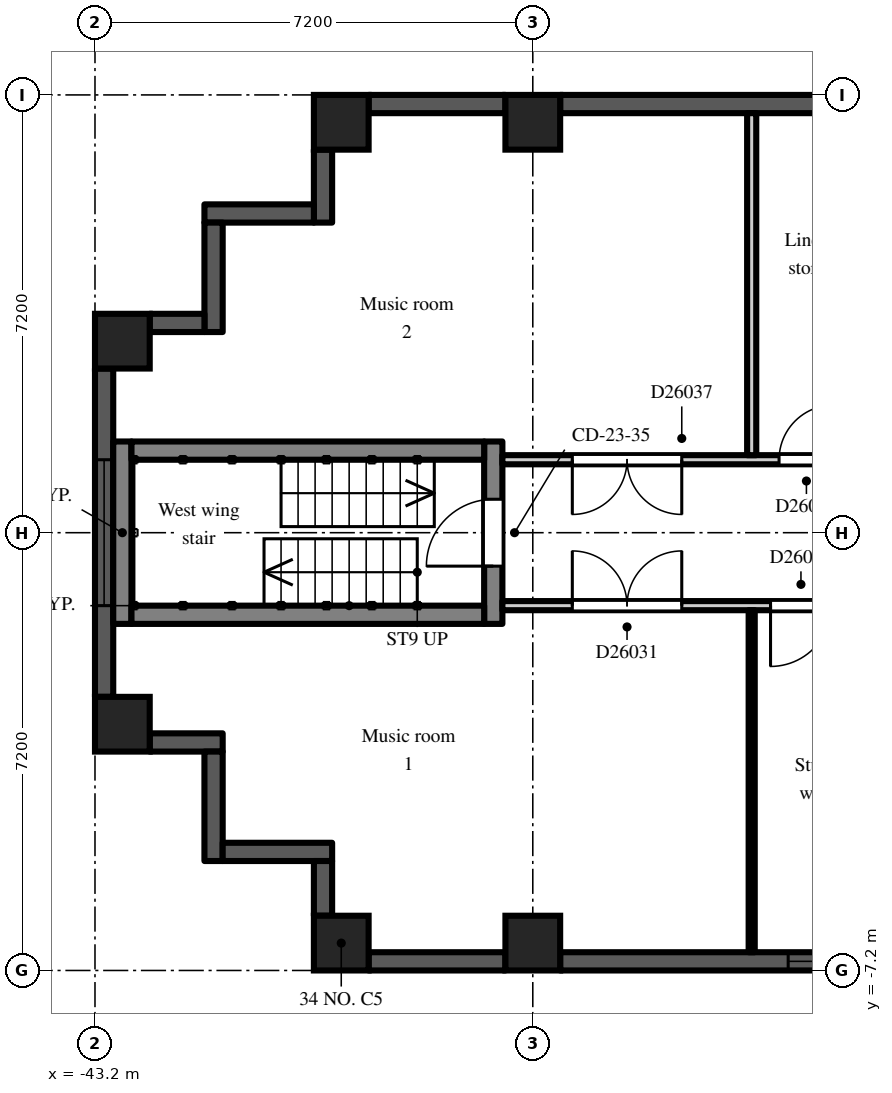
"""IFC4 building model, lengths in metres.
Left out: names, types, materials, properties, quantities, classifications, styles, units other than length and angle.
Written with IfcOpenShell. Run it as: python <this file> out.ifc"""

import sys

from ifc_helpers import new_model, si_unit, direction, frame, frame_2d, origin, origin_2d, place, context, subcontext, project, spatial, rectangle, extrude, element, fill, save


model = new_model("IFC4")
c1 = context("Model", 3, precision=1e-05, world=origin(), true_north=direction((0.0, 1.0)))
c2 = subcontext(c1, "Body", "Model", "MODEL_VIEW")
j1 = project(units=[si_unit("LENGTHUNIT", "METRE"), si_unit("PLANEANGLEUNIT", "RADIAN")], contexts=[c1])
p1 = place(None, origin())
s1 = spatial("IfcSite", under=j1, at=p1, CompositionType="ELEMENT")
p2 = place(p1, origin())
s2 = spatial("IfcBuilding", under=s1, at=p2, CompositionType="ELEMENT")
p3 = place(p2, frame((0.0, 0.0, 179.7)))
s3 = spatial("IfcBuildingStorey", under=s2, at=p3, CompositionType="ELEMENT", Elevation=179.7)
for number, where, z_axis, x_axis in (
    (1, (-42.75, -3.15, 0.0), (0.0, 0.0, 1.0), (1.0, 0.0, 0.0)),
    (2, (-42.75, 3.15, 0.0), (0.0, 0.0, 1.0), (1.0, 0.0, 0.0)),
    (3, (-39.15, -6.75, 0.0), (0.0, 0.0, 1.0), (1.0, 0.0, 0.0)),
    (4, (-39.15, 6.75, 0.0), (0.0, 0.0, 1.0), (1.0, 0.0, 0.0)),
    (5, (-36.0, -6.75, 0.0), (0.0, 0.0, 1.0), (1.0, 0.0, 0.0)),
    (6, (-36.0, 6.75, 0.0), (0.0, 0.0, 1.0), (1.0, 0.0, 0.0)),
):
    element("IfcColumn", number, at=place(p3, frame(where, z_axis=z_axis, x_axis=x_axis)), inside=s3, PredefinedType="COLUMN", context=c2, shape_type="SweptSolid", body=[
        extrude(rectangle(XDim=0.9, YDim=0.9, at=origin_2d()), origin(), (0.0, 0.0, 1.0), 3.0),
    ])
p4 = place(p3, frame((-29.25, 7.05, 0.0), z_axis=(0.0, 0.0, 1.0), x_axis=(-1.0, 0.0, 0.0)))
e7 = element("IfcWall", 7, at=p4, inside=s3, PredefinedType="SOLIDWALL", context=c2, shape_type="SweptSolid", body=[
    extrude(rectangle(XDim=6.3, YDim=0.3, at=frame_2d((3.15, 0.0))), origin(), (0.0, 0.0, 1.0), 2.2),
])
p5 = place(p3, frame((-36.45, 7.05, 0.0), z_axis=(0.0, 0.0, 1.0), x_axis=(-1.0, 0.0, 0.0)))
e8 = element("IfcWall", 8, at=p5, inside=s3, PredefinedType="SOLIDWALL", context=c2, shape_type="SweptSolid", body=[
    extrude(rectangle(XDim=2.25, YDim=0.3, at=frame_2d((1.125, 0.0))), origin(), (0.0, 0.0, 1.0), 2.2),
])
p6 = place(p3, frame((-39.45, 6.3, 0.0), z_axis=(0.0, 0.0, 1.0), x_axis=(0.0, -1.0, 0.0)))
e9 = element("IfcWall", 9, at=p6, inside=s3, PredefinedType="SOLIDWALL", context=c2, shape_type="SweptSolid", body=[
    extrude(rectangle(XDim=1.2, YDim=0.3, at=frame_2d((0.6, 0.0))), origin(), (0.0, 0.0, 1.0), 2.6),
])
p7 = place(p3, frame((-39.6, 5.25, 0.0), z_axis=(0.0, 0.0, 1.0), x_axis=(-1.0, 0.0, 0.0)))
e10 = element("IfcWall", 10, at=p7, inside=s3, PredefinedType="SOLIDWALL", context=c2, shape_type="SweptSolid", body=[
    extrude(rectangle(XDim=1.8, YDim=0.3, at=frame_2d((0.9, 0.0))), origin(), (0.0, 0.0, 1.0), 2.6),
])
p8 = place(p3, frame((-41.25, 5.1, 0.0), z_axis=(0.0, 0.0, 1.0), x_axis=(0.0, -1.0, 0.0)))
e11 = element("IfcWall", 11, at=p8, inside=s3, PredefinedType="SOLIDWALL", context=c2, shape_type="SweptSolid", body=[
    extrude(rectangle(XDim=1.8, YDim=0.3, at=frame_2d((0.9, 0.0))), origin(), (0.0, 0.0, 1.0), 2.6),
])
p9 = place(p3, frame((-41.4, 3.45, 0.0), z_axis=(0.0, 0.0, 1.0), x_axis=(-1.0, 0.0, 0.0)))
e12 = element("IfcWall", 12, at=p9, inside=s3, PredefinedType="SOLIDWALL", context=c2, shape_type="SweptSolid", body=[
    extrude(rectangle(XDim=0.9, YDim=0.3, at=frame_2d((0.45, 0.0))), origin(), (0.0, 0.0, 1.0), 2.6),
])
p10 = place(p3, frame((-43.05, 2.7, 0.0), z_axis=(0.0, 0.0, 1.0), x_axis=(0.0, -1.0, 0.0)))
e13 = element("IfcWall", 13, at=p10, inside=s3, PredefinedType="SOLIDWALL", context=c2, shape_type="SweptSolid", body=[
    extrude(rectangle(XDim=5.4, YDim=0.3, at=frame_2d((2.7, 0.0))), origin(), (0.0, 0.0, 1.0), 2.2),
])
p11 = place(p10, frame((1.5, 0.0, 0.2)))
e14 = element("IfcOpeningElement", 14, at=p11, cuts=e13, PredefinedType="OPENING", context=c2, shape_type="SweptSolid", body=[
    extrude(rectangle(XDim=2.4, YDim=1.85, at=frame_2d((1.2, 0.925))), frame((0.0, 0.16, 0.0), z_axis=(0.0, -1.0, 0.0), x_axis=(1.0, 0.0, 0.0)), (0.0, 0.0, 1.0), 0.32),
])
p12 = place(p3, frame((-42.3, -3.45, 0.0), z_axis=(0.0, 0.0, 1.0), x_axis=(1.0, 0.0, 0.0)))
e15 = element("IfcWall", 15, at=p12, inside=s3, PredefinedType="SOLIDWALL", context=c2, shape_type="SweptSolid", body=[
    extrude(rectangle(XDim=1.2, YDim=0.3, at=frame_2d((0.6, 0.0))), origin(), (0.0, 0.0, 1.0), 2.6),
])
p13 = place(p3, frame((-41.25, -3.6, 0.0), z_axis=(0.0, 0.0, 1.0), x_axis=(0.0, -1.0, 0.0)))
e16 = element("IfcWall", 16, at=p13, inside=s3, PredefinedType="SOLIDWALL", context=c2, shape_type="SweptSolid", body=[
    extrude(rectangle(XDim=1.8, YDim=0.3, at=frame_2d((0.9, 0.0))), origin(), (0.0, 0.0, 1.0), 2.6),
])
p14 = place(p3, frame((-41.1, -5.25, 0.0), z_axis=(0.0, 0.0, 1.0), x_axis=(1.0, 0.0, 0.0)))
e17 = element("IfcWall", 17, at=p14, inside=s3, PredefinedType="SOLIDWALL", context=c2, shape_type="SweptSolid", body=[
    extrude(rectangle(XDim=1.8, YDim=0.3, at=frame_2d((0.9, 0.0))), origin(), (0.0, 0.0, 1.0), 2.6),
])
p15 = place(p3, frame((-39.45, -5.4, 0.0), z_axis=(0.0, 0.0, 1.0), x_axis=(0.0, -1.0, 0.0)))
e18 = element("IfcWall", 18, at=p15, inside=s3, PredefinedType="SOLIDWALL", context=c2, shape_type="SweptSolid", body=[
    extrude(rectangle(XDim=0.9, YDim=0.3, at=frame_2d((0.45, 0.0))), origin(), (0.0, 0.0, 1.0), 2.6),
])
p16 = place(p3, frame((-38.7, -7.05, 0.0), z_axis=(0.0, 0.0, 1.0), x_axis=(1.0, 0.0, 0.0)))
e19 = element("IfcWall", 19, at=p16, inside=s3, PredefinedType="SOLIDWALL", context=c2, shape_type="SweptSolid", body=[
    extrude(rectangle(XDim=2.25, YDim=0.3, at=frame_2d((1.125, 0.0))), origin(), (0.0, 0.0, 1.0), 2.2),
])
p17 = place(p3, frame((-35.55, -7.05, 0.0), z_axis=(0.0, 0.0, 1.0), x_axis=(1.0, 0.0, 0.0)))
e20 = element("IfcWall", 20, at=p17, inside=s3, PredefinedType="SOLIDWALL", context=c2, shape_type="SweptSolid", body=[
    extrude(rectangle(XDim=6.3, YDim=0.3, at=frame_2d((3.15, 0.0))), origin(), (0.0, 0.0, 1.0), 2.2),
])
p18 = place(p17, frame((3.75, 0.0, 0.2)))
e21 = element("IfcOpeningElement", 21, at=p18, cuts=e20, PredefinedType="OPENING", context=c2, shape_type="SweptSolid", body=[
    extrude(rectangle(XDim=2.4, YDim=1.85, at=frame_2d((1.2, 0.925))), frame((0.0, 0.16, 0.0), z_axis=(0.0, -1.0, 0.0), x_axis=(1.0, 0.0, 0.0)), (0.0, 0.0, 1.0), 0.32),
])
p19 = place(p3, frame((-36.65, -1.5, 0.0), z_axis=(0.0, 0.0, 1.0), x_axis=(0.0, 1.0, 0.0)))
e22 = element("IfcWall", 22, at=p19, inside=s3, PredefinedType="SHEAR", context=c2, shape_type="SweptSolid", body=[
    extrude(rectangle(XDim=3.0, YDim=0.3, at=frame_2d((1.5, 0.0))), origin(), (0.0, 0.0, 1.0), 2.6),
])
p20 = place(p19, frame((0.95, 0.0, 0.0)))
e23 = element("IfcOpeningElement", 23, at=p20, cuts=e22, PredefinedType="OPENING", context=c2, shape_type="SweptSolid", body=[
    extrude(rectangle(XDim=1.1, YDim=2.1, at=frame_2d((0.55, 1.05))), frame((0.0, 0.16, 0.0), z_axis=(0.0, -1.0, 0.0), x_axis=(1.0, 0.0, 0.0)), (0.0, 0.0, 1.0), 0.32),
])
p21 = place(p3, frame((-42.75, -1.5, 0.0), z_axis=(0.0, 0.0, 1.0), x_axis=(0.0, 1.0, 0.0)))
e24 = element("IfcWall", 24, at=p21, inside=s3, PredefinedType="SHEAR", context=c2, shape_type="SweptSolid", body=[
    extrude(rectangle(XDim=3.0, YDim=0.3, at=frame_2d((1.5, 0.0))), origin(), (0.0, 0.0, 1.0), 2.6),
])
for number, where, z_axis, x_axis in (
    (25, (-36.8, -1.35, 0.0), (0.0, 0.0, 1.0), (-1.0, 0.0, 0.0)),
    (26, (-36.8, 1.35, 0.0), (0.0, 0.0, 1.0), (-1.0, 0.0, 0.0)),
):
    element("IfcWall", number, at=place(p3, frame(where, z_axis=z_axis, x_axis=x_axis)), inside=s3, PredefinedType="SHEAR", context=c2, shape_type="SweptSolid", body=[
        extrude(rectangle(XDim=5.8, YDim=0.3, at=frame_2d((2.9, 0.0))), origin(), (0.0, 0.0, 1.0), 2.6),
    ])
p22 = place(p3, frame((-36.5, -1.2, 0.0), z_axis=(0.0, 0.0, 1.0), x_axis=(1.0, 0.0, 0.0)))
e27 = element("IfcWall", 27, at=p22, inside=s3, PredefinedType="PARTITIONING", context=c2, shape_type="SweptSolid", body=[
    extrude(rectangle(XDim=14.9, YDim=0.15, at=frame_2d((7.45, 0.0))), origin(), (0.0, 0.0, 1.0), 2.6),
])
p23 = place(p22, frame((13.55, 0.0, 0.0)))
e28 = element("IfcOpeningElement", 28, at=p23, cuts=e27, PredefinedType="OPENING", context=c2, shape_type="SweptSolid", body=[
    extrude(rectangle(XDim=0.9, YDim=2.1, at=frame_2d((0.45, 1.05))), frame((0.0, 0.085, 0.0), z_axis=(0.0, -1.0, 0.0), x_axis=(1.0, 0.0, 0.0)), (0.0, 0.0, 1.0), 0.17),
])
p24 = place(p22, frame((11.75, 0.0, 0.0)))
e29 = element("IfcOpeningElement", 29, at=p24, cuts=e27, PredefinedType="OPENING", context=c2, shape_type="SweptSolid", body=[
    extrude(rectangle(XDim=0.9, YDim=2.1, at=frame_2d((0.45, 1.05))), frame((0.0, 0.085, 0.0), z_axis=(0.0, -1.0, 0.0), x_axis=(1.0, 0.0, 0.0)), (0.0, 0.0, 1.0), 0.17),
])
p25 = place(p22, frame((4.41, 0.0, 0.0)))
e30 = element("IfcOpeningElement", 30, at=p25, cuts=e27, PredefinedType="OPENING", context=c2, shape_type="SweptSolid", body=[
    extrude(rectangle(XDim=1.0, YDim=2.1, at=frame_2d((0.5, 1.05))), frame((0.0, 0.085, 0.0), z_axis=(0.0, -1.0, 0.0), x_axis=(1.0, 0.0, 0.0)), (0.0, 0.0, 1.0), 0.17),
])
p26 = place(p22, frame((1.15, 0.0, 0.0)))
e31 = element("IfcOpeningElement", 31, at=p26, cuts=e27, PredefinedType="OPENING", context=c2, shape_type="SweptSolid", body=[
    extrude(rectangle(XDim=1.8, YDim=2.1, at=frame_2d((0.9, 1.05))), frame((0.0, 0.085, 0.0), z_axis=(0.0, -1.0, 0.0), x_axis=(1.0, 0.0, 0.0)), (0.0, 0.0, 1.0), 0.17),
])
p27 = place(p3, frame((-36.5, 1.2, 0.0), z_axis=(0.0, 0.0, 1.0), x_axis=(1.0, 0.0, 0.0)))
e32 = element("IfcWall", 32, at=p27, inside=s3, PredefinedType="PARTITIONING", context=c2, shape_type="SweptSolid", body=[
    extrude(rectangle(XDim=14.9, YDim=0.15, at=frame_2d((7.45, 0.0))), origin(), (0.0, 0.0, 1.0), 2.6),
])
p28 = place(p27, frame((12.65, 0.0, 0.0)))
e33 = element("IfcOpeningElement", 33, at=p28, cuts=e32, PredefinedType="OPENING", context=c2, shape_type="SweptSolid", body=[
    extrude(rectangle(XDim=0.9, YDim=2.1, at=frame_2d((0.45, 1.05))), frame((0.0, 0.085, 0.0), z_axis=(0.0, -1.0, 0.0), x_axis=(1.0, 0.0, 0.0)), (0.0, 0.0, 1.0), 0.17),
])
p29 = place(p27, frame((9.95, 0.0, 0.0)))
e34 = element("IfcOpeningElement", 34, at=p29, cuts=e32, PredefinedType="OPENING", context=c2, shape_type="SweptSolid", body=[
    extrude(rectangle(XDim=0.9, YDim=2.1, at=frame_2d((0.45, 1.05))), frame((0.0, 0.085, 0.0), z_axis=(0.0, -1.0, 0.0), x_axis=(1.0, 0.0, 0.0)), (0.0, 0.0, 1.0), 0.17),
])
p30 = place(p27, frame((8.15, 0.0, 0.0)))
e35 = element("IfcOpeningElement", 35, at=p30, cuts=e32, PredefinedType="OPENING", context=c2, shape_type="SweptSolid", body=[
    extrude(rectangle(XDim=0.9, YDim=2.1, at=frame_2d((0.45, 1.05))), frame((0.0, 0.085, 0.0), z_axis=(0.0, -1.0, 0.0), x_axis=(1.0, 0.0, 0.0)), (0.0, 0.0, 1.0), 0.17),
])
p31 = place(p27, frame((6.35, 0.0, 0.0)))
e36 = element("IfcOpeningElement", 36, at=p31, cuts=e32, PredefinedType="OPENING", context=c2, shape_type="SweptSolid", body=[
    extrude(rectangle(XDim=0.9, YDim=2.1, at=frame_2d((0.45, 1.05))), frame((0.0, 0.085, 0.0), z_axis=(0.0, -1.0, 0.0), x_axis=(1.0, 0.0, 0.0)), (0.0, 0.0, 1.0), 0.17),
])
p32 = place(p27, frame((4.55, 0.0, 0.0)))
e37 = element("IfcOpeningElement", 37, at=p32, cuts=e32, PredefinedType="OPENING", context=c2, shape_type="SweptSolid", body=[
    extrude(rectangle(XDim=0.9, YDim=2.1, at=frame_2d((0.45, 1.05))), frame((0.0, 0.085, 0.0), z_axis=(0.0, -1.0, 0.0), x_axis=(1.0, 0.0, 0.0)), (0.0, 0.0, 1.0), 0.17),
])
p33 = place(p27, frame((1.15, 0.0, 0.0)))
e38 = element("IfcOpeningElement", 38, at=p33, cuts=e32, PredefinedType="OPENING", context=c2, shape_type="SweptSolid", body=[
    extrude(rectangle(XDim=1.8, YDim=2.1, at=frame_2d((0.9, 1.05))), frame((0.0, 0.085, 0.0), z_axis=(0.0, -1.0, 0.0), x_axis=(1.0, 0.0, 0.0)), (0.0, 0.0, 1.0), 0.17),
])
p34 = place(p3, frame((-32.4, -6.9, 0.0), z_axis=(0.0, 0.0, 1.0), x_axis=(0.0, 1.0, 0.0)))
e39 = element("IfcWall", 39, at=p34, inside=s3, PredefinedType="PARTITIONING", context=c2, shape_type="SweptSolid", body=[
    extrude(rectangle(XDim=5.625, YDim=0.1, at=frame_2d((2.812, 0.0))), origin(), (0.0, 0.0, 1.0), 2.6),
])
p35 = place(p3, frame((-32.4, 1.275, 0.0), z_axis=(0.0, 0.0, 1.0), x_axis=(0.0, 1.0, 0.0)))
e40 = element("IfcWall", 40, at=p35, inside=s3, PredefinedType="PARTITIONING", context=c2, shape_type="SweptSolid", body=[
    extrude(rectangle(XDim=5.625, YDim=0.15, at=frame_2d((2.812, 0.0))), origin(), (0.0, 0.0, 1.0), 2.6),
])
p36 = place(p11, origin())
e41 = element("IfcWindow", 41, at=p36, inside=s3, PartitioningType="SINGLE_PANEL", PredefinedType="WINDOW", context=c2, shape_type="SweptSolid", body=[
    extrude(rectangle(XDim=2.4, YDim=1.85, at=frame_2d((1.2, 0.925))), frame((0.0, 0.03, 0.0), z_axis=(0.0, -1.0, 0.0), x_axis=(1.0, 0.0, 0.0)), (0.0, 0.0, 1.0), 0.06),
])
fill(e14, e41)
p37 = place(p18, origin())
e42 = element("IfcWindow", 42, at=p37, inside=s3, PartitioningType="SINGLE_PANEL", PredefinedType="WINDOW", context=c2, shape_type="SweptSolid", body=[
    extrude(rectangle(XDim=2.4, YDim=1.85, at=frame_2d((1.2, 0.925))), frame((0.0, 0.03, 0.0), z_axis=(0.0, -1.0, 0.0), x_axis=(1.0, 0.0, 0.0)), (0.0, 0.0, 1.0), 0.06),
])
fill(e21, e42)
p38 = place(p20, origin())
e43 = element("IfcDoor", 43, at=p38, inside=s3, OperationType="SINGLE_SWING_LEFT", PredefinedType="DOOR", context=c2, shape_type="SweptSolid", body=[
    extrude(rectangle(XDim=1.1, YDim=2.1, at=frame_2d((0.55, 1.05))), frame((0.0, 0.025, 0.0), z_axis=(0.0, -1.0, 0.0), x_axis=(1.0, 0.0, 0.0)), (0.0, 0.0, 1.0), 0.05),
])
fill(e23, e43)
p39 = place(p25, frame((1.0, 0.0, 0.0), z_axis=(0.0, 0.0, 1.0), x_axis=(-1.0, 0.0, 0.0)))
e44 = element("IfcDoor", 44, at=p39, inside=s3, OperationType="SINGLE_SWING_RIGHT", PredefinedType="DOOR", context=c2, shape_type="SweptSolid", body=[
    extrude(rectangle(XDim=1.0, YDim=2.1, at=frame_2d((0.5, 1.05))), frame((0.0, 0.025, 0.0), z_axis=(0.0, -1.0, 0.0), x_axis=(1.0, 0.0, 0.0)), (0.0, 0.0, 1.0), 0.05),
])
fill(e30, e44)
p40 = place(p26, origin())
e45 = element("IfcDoor", 45, at=p40, inside=s3, OperationType="DOUBLE_DOOR_DOUBLE_SWING", PredefinedType="DOOR", context=c2, shape_type="SweptSolid", body=[
    extrude(rectangle(XDim=1.8, YDim=2.1, at=frame_2d((0.9, 1.05))), frame((0.0, 0.025, 0.0), z_axis=(0.0, -1.0, 0.0), x_axis=(1.0, 0.0, 0.0)), (0.0, 0.0, 1.0), 0.05),
])
fill(e31, e45)
p41 = place(p32, origin())
e46 = element("IfcDoor", 46, at=p41, inside=s3, OperationType="SINGLE_SWING_RIGHT", PredefinedType="DOOR", context=c2, shape_type="SweptSolid", body=[
    extrude(rectangle(XDim=0.9, YDim=2.1, at=frame_2d((0.45, 1.05))), frame((0.0, 0.025, 0.0), z_axis=(0.0, -1.0, 0.0), x_axis=(1.0, 0.0, 0.0)), (0.0, 0.0, 1.0), 0.05),
])
fill(e37, e46)
p42 = place(p33, frame((1.8, 0.0, 0.0), z_axis=(0.0, 0.0, 1.0), x_axis=(-1.0, 0.0, 0.0)))
e47 = element("IfcDoor", 47, at=p42, inside=s3, OperationType="DOUBLE_DOOR_DOUBLE_SWING", PredefinedType="DOOR", context=c2, shape_type="SweptSolid", body=[
    extrude(rectangle(XDim=1.8, YDim=2.1, at=frame_2d((0.9, 1.05))), frame((0.0, 0.025, 0.0), z_axis=(0.0, -1.0, 0.0), x_axis=(1.0, 0.0, 0.0)), (0.0, 0.0, 1.0), 0.05),
])
fill(e38, e47)
save(model, sys.argv[1])
